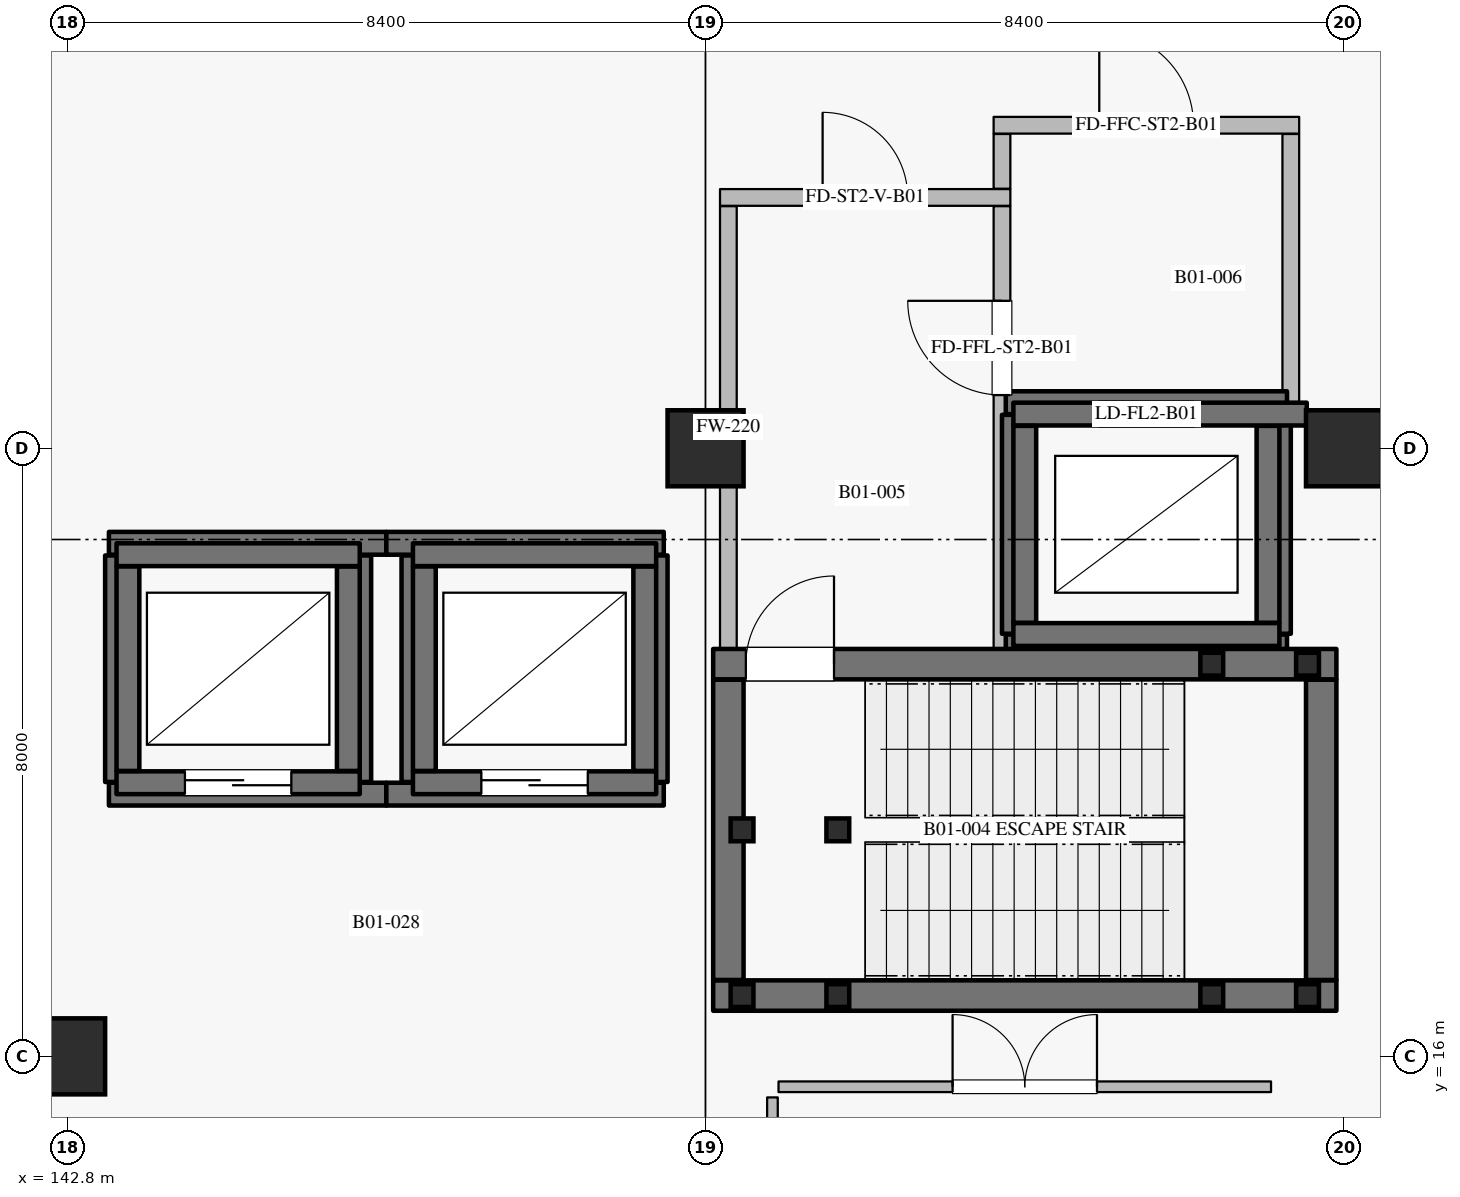
"""IFC4 building model, lengths in metres.
Left out: names, types, materials, properties, quantities, classifications, styles, units other than length and angle.
Written with IfcOpenShell. Run it as: python <this file> out.ifc"""

import sys

from ifc_helpers import new_model, si_unit, direction, frame, frame_2d, origin, origin_2d, place, context, subcontext, project, spatial, rectangle, hollow_rectangle, extrude, element, fill, save


model = new_model("IFC4")
c1 = context("Model", 3, precision=1e-05, world=origin(), true_north=direction((0.0, 1.0)))
c2 = subcontext(c1, "Body", "Model", "MODEL_VIEW")
j1 = project(units=[si_unit("LENGTHUNIT", "METRE"), si_unit("PLANEANGLEUNIT", "RADIAN")], contexts=[c1])
p1 = place(None, origin())
s1 = spatial("IfcSite", under=j1, at=p1, CompositionType="ELEMENT")
p2 = place(p1, origin())
s2 = spatial("IfcBuilding", under=s1, at=p2, CompositionType="ELEMENT")
p3 = place(p2, frame((0.0, 0.0, -5.4)))
s3 = spatial("IfcBuildingStorey", under=s2, at=p3, CompositionType="ELEMENT", Elevation=-5.4)
for number, where, z_axis, x_axis in (
    (1, (142.8, 16.0, 0.0), (0.0, 0.0, 1.0), (1.0, 0.0, 0.0)),
    (2, (151.2, 24.0, 0.0), (0.0, 0.0, 1.0), (1.0, 0.0, 0.0)),
    (3, (159.6, 24.0, 0.0), (0.0, 0.0, 1.0), (1.0, 0.0, 0.0)),
):
    element("IfcColumn", number, at=place(p3, frame(where, z_axis=z_axis, x_axis=x_axis)), inside=s3, PredefinedType="COLUMN", context=c2, shape_type="SweptSolid", body=[
        extrude(rectangle(XDim=1.0, YDim=1.0, at=origin_2d()), origin(), (0.0, 0.0, 1.0), 5.4),
    ])
p4 = place(p3, frame((155.15, 21.4, -1.4), z_axis=(0.0, 0.0, 1.0), x_axis=(1.0, 0.0, 0.0)))
e4 = element("IfcWall", 4, at=p4, inside=s3, PredefinedType="USERDEFINED", context=c2, shape_type="SweptSolid", body=[
    extrude(rectangle(XDim=3.7, YDim=0.3, at=frame_2d((1.85, 0.0))), origin(), (0.0, 0.0, 1.0), 1.4),
])
p5 = place(p3, frame((158.75, 21.56, -1.4), z_axis=(0.0, 0.0, 1.0), x_axis=(0.0, 1.0, 0.0)))
e5 = element("IfcWall", 5, at=p5, inside=s3, PredefinedType="USERDEFINED", context=c2, shape_type="SweptSolid", body=[
    extrude(rectangle(XDim=2.88, YDim=0.3, at=frame_2d((1.44, 0.0))), origin(), (0.0, 0.0, 1.0), 1.4),
])
p6 = place(p3, frame((158.85, 24.6, -1.4), z_axis=(0.0, 0.0, 1.0), x_axis=(-1.0, 0.0, 0.0)))
e6 = element("IfcWall", 6, at=p6, inside=s3, PredefinedType="USERDEFINED", context=c2, shape_type="SweptSolid", body=[
    extrude(rectangle(XDim=3.7, YDim=0.3, at=frame_2d((1.85, 0.0))), origin(), (0.0, 0.0, 1.0), 1.4),
])
p7 = place(p3, frame((155.25, 24.44, -1.4), z_axis=(0.0, 0.0, 1.0), x_axis=(0.0, -1.0, 0.0)))
e7 = element("IfcWall", 7, at=p7, inside=s3, PredefinedType="USERDEFINED", context=c2, shape_type="SweptSolid", body=[
    extrude(rectangle(XDim=2.88, YDim=0.3, at=frame_2d((1.44, 0.0))), origin(), (0.0, 0.0, 1.0), 1.4),
])
p8 = place(p3, frame((143.35, 19.45, -1.4), z_axis=(0.0, 0.0, 1.0), x_axis=(1.0, 0.0, 0.0)))
e8 = element("IfcWall", 8, at=p8, inside=s3, PredefinedType="USERDEFINED", context=c2, shape_type="SweptSolid", body=[
    extrude(rectangle(XDim=3.65, YDim=0.3, at=frame_2d((1.825, 0.0))), origin(), (0.0, 0.0, 1.0), 1.4),
])
p9 = place(p3, frame((146.65, 19.61, -1.4), z_axis=(0.0, 0.0, 1.0), x_axis=(0.0, 1.0, 0.0)))
e9 = element("IfcWall", 9, at=p9, inside=s3, PredefinedType="USERDEFINED", context=c2, shape_type="SweptSolid", body=[
    extrude(rectangle(XDim=2.98, YDim=0.3, at=frame_2d((1.49, 0.0))), origin(), (0.0, 0.0, 1.0), 1.4),
])
p10 = place(p3, frame((147.0, 22.75, -1.4), z_axis=(0.0, 0.0, 1.0), x_axis=(-1.0, 0.0, 0.0)))
e10 = element("IfcWall", 10, at=p10, inside=s3, PredefinedType="USERDEFINED", context=c2, shape_type="SweptSolid", body=[
    extrude(rectangle(XDim=3.65, YDim=0.3, at=frame_2d((1.825, 0.0))), origin(), (0.0, 0.0, 1.0), 1.4),
])
p11 = place(p3, frame((143.45, 22.59, -1.4), z_axis=(0.0, 0.0, 1.0), x_axis=(0.0, -1.0, 0.0)))
e11 = element("IfcWall", 11, at=p11, inside=s3, PredefinedType="USERDEFINED", context=c2, shape_type="SweptSolid", body=[
    extrude(rectangle(XDim=2.98, YDim=0.3, at=frame_2d((1.49, 0.0))), origin(), (0.0, 0.0, 1.0), 1.4),
])
p12 = place(p3, frame((147.0, 19.45, -1.4), z_axis=(0.0, 0.0, 1.0), x_axis=(1.0, 0.0, 0.0)))
e12 = element("IfcWall", 12, at=p12, inside=s3, PredefinedType="USERDEFINED", context=c2, shape_type="SweptSolid", body=[
    extrude(rectangle(XDim=3.65, YDim=0.3, at=frame_2d((1.825, 0.0))), origin(), (0.0, 0.0, 1.0), 1.4),
])
p13 = place(p3, frame((150.55, 19.61, -1.4), z_axis=(0.0, 0.0, 1.0), x_axis=(0.0, 1.0, 0.0)))
e13 = element("IfcWall", 13, at=p13, inside=s3, PredefinedType="USERDEFINED", context=c2, shape_type="SweptSolid", body=[
    extrude(rectangle(XDim=2.98, YDim=0.3, at=frame_2d((1.49, 0.0))), origin(), (0.0, 0.0, 1.0), 1.4),
])
p14 = place(p3, frame((150.65, 22.75, -1.4), z_axis=(0.0, 0.0, 1.0), x_axis=(-1.0, 0.0, 0.0)))
e14 = element("IfcWall", 14, at=p14, inside=s3, PredefinedType="USERDEFINED", context=c2, shape_type="SweptSolid", body=[
    extrude(rectangle(XDim=3.65, YDim=0.3, at=frame_2d((1.825, 0.0))), origin(), (0.0, 0.0, 1.0), 1.4),
])
p15 = place(p3, frame((147.35, 22.59, -1.4), z_axis=(0.0, 0.0, 1.0), x_axis=(0.0, -1.0, 0.0)))
e15 = element("IfcWall", 15, at=p15, inside=s3, PredefinedType="USERDEFINED", context=c2, shape_type="SweptSolid", body=[
    extrude(rectangle(XDim=2.98, YDim=0.3, at=frame_2d((1.49, 0.0))), origin(), (0.0, 0.0, 1.0), 1.4),
])
p16 = place(p3, frame((167.638, 15.655, 0.0), z_axis=(0.0, 0.0, 1.0), x_axis=(-0.72415874468, -0.689633317426, 0.0)))
e16 = element("IfcWall", 16, at=p16, inside=s3, PredefinedType="USERDEFINED", context=c2, shape_type="SweptSolid", body=[
    extrude(rectangle(XDim=10.6, YDim=0.45, at=frame_2d((5.3, 0.0))), origin(), (0.0, 0.0, 1.0), 4.3),
])
p17 = place(p3, frame((155.25, 21.55, 0.0), z_axis=(0.0, 0.0, 1.0), x_axis=(1.0, 0.0, 0.0)))
e17 = element("IfcWall", 17, at=p17, inside=s3, PredefinedType="SHEAR", context=c2, shape_type="SweptSolid", body=[
    extrude(rectangle(XDim=3.5, YDim=0.3, at=frame_2d((1.75, 0.0))), origin(), (0.0, 0.0, 1.0), 4.995),
])
p18 = place(p3, frame((158.6, 21.705, 0.0), z_axis=(0.0, 0.0, 1.0), x_axis=(0.0, 1.0, 0.0)))
e18 = element("IfcWall", 18, at=p18, inside=s3, PredefinedType="SHEAR", context=c2, shape_type="SweptSolid", body=[
    extrude(rectangle(XDim=2.59, YDim=0.3, at=frame_2d((1.295, 0.0))), origin(), (0.0, 0.0, 1.0), 4.995),
])
p19 = place(p3, frame((159.11, 24.45, 0.0), z_axis=(0.0, 0.0, 1.0), x_axis=(-1.0, 0.0, 0.0)))
e19 = element("IfcWall", 19, at=p19, inside=s3, PredefinedType="SHEAR", context=c2, shape_type="SweptSolid", body=[
    extrude(rectangle(XDim=3.86, YDim=0.3, at=frame_2d((1.93, 0.0))), origin(), (0.0, 0.0, 1.0), 4.995),
])
p20 = place(p19, frame((1.485, 0.0, 0.0)))
e20 = element("IfcOpeningElement", 20, at=p20, cuts=e19, PredefinedType="OPENING", context=c2, shape_type="SweptSolid", body=[
    extrude(rectangle(XDim=1.25, YDim=2.25, at=frame_2d((0.625, 1.125))), frame((0.0, 0.16, 0.0), z_axis=(0.0, -1.0, 0.0), x_axis=(1.0, 0.0, 0.0)), (0.0, 0.0, 1.0), 0.32),
])
p21 = place(p3, frame((155.4, 24.295, 0.0), z_axis=(0.0, 0.0, 1.0), x_axis=(0.0, -1.0, 0.0)))
e21 = element("IfcWall", 21, at=p21, inside=s3, PredefinedType="SHEAR", context=c2, shape_type="SweptSolid", body=[
    extrude(rectangle(XDim=2.59, YDim=0.3, at=frame_2d((1.295, 0.0))), origin(), (0.0, 0.0, 1.0), 4.995),
])
p22 = place(p3, frame((143.45, 19.6, 0.0), z_axis=(0.0, 0.0, 1.0), x_axis=(1.0, 0.0, 0.0)))
e22 = element("IfcWall", 22, at=p22, inside=s3, PredefinedType="SHEAR", context=c2, shape_type="SweptSolid", body=[
    extrude(rectangle(XDim=3.2, YDim=0.3, at=frame_2d((1.6, 0.0))), origin(), (0.0, 0.0, 1.0), 4.995),
])
p23 = place(p22, frame((0.9, 0.0, 0.0)))
e23 = element("IfcOpeningElement", 23, at=p23, cuts=e22, PredefinedType="OPENING", context=c2, shape_type="SweptSolid", body=[
    extrude(rectangle(XDim=1.4, YDim=2.35, at=frame_2d((0.7, 1.175))), frame((0.0, 0.16, 0.0), z_axis=(0.0, -1.0, 0.0), x_axis=(1.0, 0.0, 0.0)), (0.0, 0.0, 1.0), 0.32),
])
p24 = place(p3, frame((146.5, 19.755, 0.0), z_axis=(0.0, 0.0, 1.0), x_axis=(0.0, 1.0, 0.0)))
e24 = element("IfcWall", 24, at=p24, inside=s3, PredefinedType="SHEAR", context=c2, shape_type="SweptSolid", body=[
    extrude(rectangle(XDim=2.69, YDim=0.3, at=frame_2d((1.345, 0.0))), origin(), (0.0, 0.0, 1.0), 4.995),
])
p25 = place(p3, frame((146.65, 22.6, 0.0), z_axis=(0.0, 0.0, 1.0), x_axis=(-1.0, 0.0, 0.0)))
e25 = element("IfcWall", 25, at=p25, inside=s3, PredefinedType="SHEAR", context=c2, shape_type="SweptSolid", body=[
    extrude(rectangle(XDim=3.2, YDim=0.3, at=frame_2d((1.6, 0.0))), origin(), (0.0, 0.0, 1.0), 4.995),
])
p26 = place(p3, frame((143.6, 22.445, 0.0), z_axis=(0.0, 0.0, 1.0), x_axis=(0.0, -1.0, 0.0)))
e26 = element("IfcWall", 26, at=p26, inside=s3, PredefinedType="SHEAR", context=c2, shape_type="SweptSolid", body=[
    extrude(rectangle(XDim=2.69, YDim=0.3, at=frame_2d((1.345, 0.0))), origin(), (0.0, 0.0, 1.0), 4.995),
])
p27 = place(p3, frame((147.35, 19.6, 0.0), z_axis=(0.0, 0.0, 1.0), x_axis=(1.0, 0.0, 0.0)))
e27 = element("IfcWall", 27, at=p27, inside=s3, PredefinedType="SHEAR", context=c2, shape_type="SweptSolid", body=[
    extrude(rectangle(XDim=3.2, YDim=0.3, at=frame_2d((1.6, 0.0))), origin(), (0.0, 0.0, 1.0), 4.995),
])
p28 = place(p27, frame((0.9, 0.0, 0.0)))
e28 = element("IfcOpeningElement", 28, at=p28, cuts=e27, PredefinedType="OPENING", context=c2, shape_type="SweptSolid", body=[
    extrude(rectangle(XDim=1.4, YDim=2.35, at=frame_2d((0.7, 1.175))), frame((0.0, 0.16, 0.0), z_axis=(0.0, -1.0, 0.0), x_axis=(1.0, 0.0, 0.0)), (0.0, 0.0, 1.0), 0.32),
])
p29 = place(p3, frame((150.4, 19.755, 0.0), z_axis=(0.0, 0.0, 1.0), x_axis=(0.0, 1.0, 0.0)))
e29 = element("IfcWall", 29, at=p29, inside=s3, PredefinedType="SHEAR", context=c2, shape_type="SweptSolid", body=[
    extrude(rectangle(XDim=2.69, YDim=0.3, at=frame_2d((1.345, 0.0))), origin(), (0.0, 0.0, 1.0), 4.995),
])
p30 = place(p3, frame((150.55, 22.6, 0.0), z_axis=(0.0, 0.0, 1.0), x_axis=(-1.0, 0.0, 0.0)))
e30 = element("IfcWall", 30, at=p30, inside=s3, PredefinedType="SHEAR", context=c2, shape_type="SweptSolid", body=[
    extrude(rectangle(XDim=3.2, YDim=0.3, at=frame_2d((1.6, 0.0))), origin(), (0.0, 0.0, 1.0), 4.995),
])
p31 = place(p3, frame((147.5, 22.445, 0.0), z_axis=(0.0, 0.0, 1.0), x_axis=(0.0, -1.0, 0.0)))
e31 = element("IfcWall", 31, at=p31, inside=s3, PredefinedType="SHEAR", context=c2, shape_type="SweptSolid", body=[
    extrude(rectangle(XDim=2.69, YDim=0.3, at=frame_2d((1.345, 0.0))), origin(), (0.0, 0.0, 1.0), 4.995),
])
p32 = place(p3, frame((151.3, 16.8, 0.0), z_axis=(0.0, 0.0, 1.0), x_axis=(1.0, 0.0, 0.0)))
e32 = element("IfcWall", 32, at=p32, inside=s3, PredefinedType="SHEAR", context=c2, shape_type="SweptSolid", body=[
    extrude(rectangle(XDim=8.2, YDim=0.4, at=frame_2d((4.1, 0.0))), origin(), (0.0, 0.0, 1.0), 4.995),
])
p33 = place(p3, frame((159.3, 17.005, 0.0), z_axis=(0.0, 0.0, 1.0), x_axis=(0.0, 1.0, 0.0)))
e33 = element("IfcWall", 33, at=p33, inside=s3, PredefinedType="SHEAR", context=c2, shape_type="SweptSolid", body=[
    extrude(rectangle(XDim=3.95, YDim=0.4, at=frame_2d((1.975, 0.0))), origin(), (0.0, 0.0, 1.0), 4.995),
])
p34 = place(p3, frame((151.3, 21.16, 0.0), z_axis=(0.0, 0.0, 1.0), x_axis=(1.0, 0.0, 0.0)))
e34 = element("IfcWall", 34, at=p34, inside=s3, PredefinedType="SHEAR", context=c2, shape_type="SweptSolid", body=[
    extrude(rectangle(XDim=8.2, YDim=0.4, at=frame_2d((4.1, 0.0))), origin(), (0.0, 0.0, 1.0), 4.995),
])
p35 = place(p34, frame((0.43, 0.0, 0.0)))
e35 = element("IfcOpeningElement", 35, at=p35, cuts=e34, PredefinedType="OPENING", context=c2, shape_type="SweptSolid", body=[
    extrude(rectangle(XDim=1.16, YDim=2.2, at=frame_2d((0.58, 1.1))), frame((0.0, 0.21, 0.0), z_axis=(0.0, -1.0, 0.0), x_axis=(1.0, 0.0, 0.0)), (0.0, 0.0, 1.0), 0.42),
])
p36 = place(p3, frame((151.5, 17.005, 0.0), z_axis=(0.0, 0.0, 1.0), x_axis=(0.0, 1.0, 0.0)))
e36 = element("IfcWall", 36, at=p36, inside=s3, PredefinedType="SHEAR", context=c2, shape_type="SweptSolid", body=[
    extrude(rectangle(XDim=3.95, YDim=0.4, at=frame_2d((1.975, 0.0))), origin(), (0.0, 0.0, 1.0), 4.995),
])
p37 = place(p3, frame((151.5, 21.365, 0.0), z_axis=(0.0, 0.0, 1.0), x_axis=(0.0, 1.0, 0.0)))
e37 = element("IfcWall", 37, at=p37, inside=s3, PredefinedType="PARTITIONING", context=c2, shape_type="SweptSolid", body=[
    extrude(rectangle(XDim=5.82, YDim=0.22, at=frame_2d((2.91, 0.0))), origin(), (0.0, 0.0, 1.0), 4.05),
])
p38 = place(p3, frame((151.39, 27.3, 0.0), z_axis=(0.0, 0.0, 1.0), x_axis=(1.0, 0.0, 0.0)))
e38 = element("IfcWall", 38, at=p38, inside=s3, PredefinedType="PARTITIONING", context=c2, shape_type="SweptSolid", body=[
    extrude(rectangle(XDim=3.82, YDim=0.22, at=frame_2d((1.91, 0.0))), origin(), (0.0, 0.0, 1.0), 4.995),
])
p39 = place(p38, frame((1.35, 0.0, 0.0)))
e39 = element("IfcOpeningElement", 39, at=p39, cuts=e38, PredefinedType="OPENING", context=c2, shape_type="SweptSolid", body=[
    extrude(rectangle(XDim=1.12, YDim=2.2, at=frame_2d((0.56, 1.1))), frame((0.0, 0.12, 0.0), z_axis=(0.0, -1.0, 0.0), x_axis=(1.0, 0.0, 0.0)), (0.0, 0.0, 1.0), 0.24),
])
p40 = place(p3, frame((155.1, 21.365, 0.0), z_axis=(0.0, 0.0, 1.0), x_axis=(0.0, 1.0, 0.0)))
e40 = element("IfcWall", 40, at=p40, inside=s3, PredefinedType="PARTITIONING", context=c2, shape_type="SweptSolid", body=[
    extrude(rectangle(XDim=5.82, YDim=0.22, at=frame_2d((2.91, 0.0))), origin(), (0.0, 0.0, 1.0), 4.995),
])
p41 = place(p40, frame((3.335, 0.0, 0.0)))
e41 = element("IfcOpeningElement", 41, at=p41, cuts=e40, PredefinedType="OPENING", context=c2, shape_type="SweptSolid", body=[
    extrude(rectangle(XDim=1.24, YDim=2.2, at=frame_2d((0.62, 1.1))), frame((0.0, 0.12, 0.0), z_axis=(0.0, -1.0, 0.0), x_axis=(1.0, 0.0, 0.0)), (0.0, 0.0, 1.0), 0.24),
])
p42 = place(p3, frame((155.1, 27.415, 0.0), z_axis=(0.0, 0.0, 1.0), x_axis=(0.0, 1.0, 0.0)))
e42 = element("IfcWall", 42, at=p42, inside=s3, PredefinedType="PARTITIONING", context=c2, shape_type="SweptSolid", body=[
    extrude(rectangle(XDim=0.72, YDim=0.22, at=frame_2d((0.36, 0.0))), origin(), (0.0, 0.0, 1.0), 4.995),
])
p43 = place(p3, frame((158.9, 24.605, 0.0), z_axis=(0.0, 0.0, 1.0), x_axis=(0.0, 1.0, 0.0)))
e43 = element("IfcWall", 43, at=p43, inside=s3, PredefinedType="PARTITIONING", context=c2, shape_type="SweptSolid", body=[
    extrude(rectangle(XDim=3.53, YDim=0.22, at=frame_2d((1.765, 0.0))), origin(), (0.0, 0.0, 1.0), 4.995),
])
p44 = place(p3, frame((154.99, 28.25, 0.0), z_axis=(0.0, 0.0, 1.0), x_axis=(1.0, 0.0, 0.0)))
e44 = element("IfcWall", 44, at=p44, inside=s3, PredefinedType="PARTITIONING", context=c2, shape_type="SweptSolid", body=[
    extrude(rectangle(XDim=4.02, YDim=0.22, at=frame_2d((2.01, 0.0))), origin(), (0.0, 0.0, 1.0), 4.995),
])
p45 = place(p44, frame((1.39, 0.0, 0.0)))
e45 = element("IfcOpeningElement", 45, at=p45, cuts=e44, PredefinedType="OPENING", context=c2, shape_type="SweptSolid", body=[
    extrude(rectangle(XDim=1.24, YDim=2.2, at=frame_2d((0.62, 1.1))), frame((0.0, 0.12, 0.0), z_axis=(0.0, -1.0, 0.0), x_axis=(1.0, 0.0, 0.0)), (0.0, 0.0, 1.0), 0.24),
])
for number, where, z_axis, x_axis in (
    (46, (151.68, 16.8, 0.0), (0.0, 0.0, 1.0), (1.0, 0.0, 0.0)),
    (47, (151.68, 18.98, 0.0), (0.0, 0.0, 1.0), (1.0, 0.0, 0.0)),
    (48, (152.94, 16.8, 0.0), (0.0, 0.0, 1.0), (1.0, 0.0, 0.0)),
    (49, (152.94, 18.98, 0.0), (0.0, 0.0, 1.0), (1.0, 0.0, 0.0)),
):
    element("IfcColumn", number, at=place(p3, frame(where, z_axis=z_axis, x_axis=x_axis)), inside=s3, PredefinedType="COLUMN", context=c2, shape_type="SweptSolid", body=[
        extrude(hollow_rectangle(XDim=0.3, YDim=0.3, WallThickness=0.012, at=origin_2d()), origin(), (0.0, 0.0, 1.0), 5.22),
    ])
for number, where, z_axis, x_axis in (
    (50, (157.86, 16.8, 0.0), (0.0, 0.0, 1.0), (1.0, 0.0, 0.0)),
    (51, (157.86, 21.16, 0.0), (0.0, 0.0, 1.0), (1.0, 0.0, 0.0)),
    (52, (159.12, 16.8, 0.0), (0.0, 0.0, 1.0), (1.0, 0.0, 0.0)),
    (53, (159.12, 21.16, 0.0), (0.0, 0.0, 1.0), (1.0, 0.0, 0.0)),
):
    element("IfcColumn", number, at=place(p3, frame(where, z_axis=z_axis, x_axis=x_axis)), inside=s3, PredefinedType="COLUMN", context=c2, shape_type="SweptSolid", body=[
        extrude(hollow_rectangle(XDim=0.3, YDim=0.3, WallThickness=0.012, at=origin_2d()), origin(), (0.0, 0.0, 1.0), 2.52),
    ])
p46 = place(p3, frame((152.16, 15.6, 0.0), z_axis=(0.0, 0.0, 1.0), x_axis=(1.0, 0.0, 0.0)))
e54 = element("IfcWall", 54, at=p46, inside=s3, PredefinedType="PARTITIONING", context=c2, shape_type="SweptSolid", body=[
    extrude(rectangle(XDim=6.48, YDim=0.14, at=frame_2d((3.24, 0.0))), origin(), (0.0, 0.0, 1.0), 4.995),
])
p47 = place(p46, frame((2.29, 0.0, 0.0)))
e55 = element("IfcOpeningElement", 55, at=p47, cuts=e54, PredefinedType="OPENING", context=c2, shape_type="SweptSolid", body=[
    extrude(rectangle(XDim=1.9, YDim=2.4, at=frame_2d((0.95, 1.2))), frame((0.0, 0.08, 0.0), z_axis=(0.0, -1.0, 0.0), x_axis=(1.0, 0.0, 0.0)), (0.0, 0.0, 1.0), 0.16),
])
p48 = place(p3, frame((152.08, 9.45, 0.0), z_axis=(0.0, 0.0, 1.0), x_axis=(0.0, 1.0, 0.0)))
e56 = element("IfcWall", 56, at=p48, inside=s3, PredefinedType="PARTITIONING", context=c2, shape_type="SweptSolid", body=[
    extrude(rectangle(XDim=6.01, YDim=0.14, at=frame_2d((3.005, 0.0))), origin(), (0.0, 0.0, 1.0), 4.995),
])
p49 = place(p20, origin())
e57 = element("IfcDoor", 57, at=p49, inside=s3, OperationType="DOUBLE_DOOR_SLIDING", PredefinedType="DOOR", context=c2, shape_type="SweptSolid", body=[
    extrude(rectangle(XDim=1.25, YDim=2.25, at=frame_2d((0.625, 1.125))), frame((0.0, 0.025, 0.0), z_axis=(0.0, -1.0, 0.0), x_axis=(1.0, 0.0, 0.0)), (0.0, 0.0, 1.0), 0.05),
])
fill(e20, e57)
p50 = place(p23, origin())
e58 = element("IfcDoor", 58, at=p50, inside=s3, OperationType="DOUBLE_DOOR_SLIDING", PredefinedType="DOOR", context=c2, shape_type="SweptSolid", body=[
    extrude(rectangle(XDim=1.4, YDim=2.35, at=frame_2d((0.7, 1.175))), frame((0.0, 0.025, 0.0), z_axis=(0.0, -1.0, 0.0), x_axis=(1.0, 0.0, 0.0)), (0.0, 0.0, 1.0), 0.05),
])
fill(e23, e58)
p51 = place(p28, origin())
e59 = element("IfcDoor", 59, at=p51, inside=s3, OperationType="DOUBLE_DOOR_SLIDING", PredefinedType="DOOR", context=c2, shape_type="SweptSolid", body=[
    extrude(rectangle(XDim=1.4, YDim=2.35, at=frame_2d((0.7, 1.175))), frame((0.0, 0.025, 0.0), z_axis=(0.0, -1.0, 0.0), x_axis=(1.0, 0.0, 0.0)), (0.0, 0.0, 1.0), 0.05),
])
fill(e28, e59)
p52 = place(p35, origin())
e60 = element("IfcDoor", 60, at=p52, inside=s3, OperationType="SINGLE_SWING_RIGHT", PredefinedType="DOOR", context=c2, shape_type="SweptSolid", body=[
    extrude(rectangle(XDim=1.16, YDim=2.2, at=frame_2d((0.58, 1.1))), frame((0.0, 0.025, 0.0), z_axis=(0.0, -1.0, 0.0), x_axis=(1.0, 0.0, 0.0)), (0.0, 0.0, 1.0), 0.05),
])
fill(e35, e60)
p53 = place(p39, origin())
e61 = element("IfcDoor", 61, at=p53, inside=s3, OperationType="SINGLE_SWING_LEFT", PredefinedType="DOOR", context=c2, shape_type="SweptSolid", body=[
    extrude(rectangle(XDim=1.12, YDim=2.2, at=frame_2d((0.56, 1.1))), frame((0.0, 0.025, 0.0), z_axis=(0.0, -1.0, 0.0), x_axis=(1.0, 0.0, 0.0)), (0.0, 0.0, 1.0), 0.05),
])
fill(e39, e61)
p54 = place(p41, origin())
e62 = element("IfcDoor", 62, at=p54, inside=s3, OperationType="SINGLE_SWING_RIGHT", PredefinedType="DOOR", context=c2, shape_type="SweptSolid", body=[
    extrude(rectangle(XDim=1.24, YDim=2.2, at=frame_2d((0.62, 1.1))), frame((0.0, 0.025, 0.0), z_axis=(0.0, -1.0, 0.0), x_axis=(1.0, 0.0, 0.0)), (0.0, 0.0, 1.0), 0.05),
])
fill(e41, e62)
p55 = place(p45, origin())
e63 = element("IfcDoor", 63, at=p55, inside=s3, OperationType="SINGLE_SWING_LEFT", PredefinedType="DOOR", context=c2, shape_type="SweptSolid", body=[
    extrude(rectangle(XDim=1.24, YDim=2.2, at=frame_2d((0.62, 1.1))), frame((0.0, 0.025, 0.0), z_axis=(0.0, -1.0, 0.0), x_axis=(1.0, 0.0, 0.0)), (0.0, 0.0, 1.0), 0.05),
])
fill(e45, e63)
p56 = place(p47, origin())
e64 = element("IfcDoor", 64, at=p56, inside=s3, OperationType="DOUBLE_DOOR_SINGLE_SWING", PredefinedType="DOOR", context=c2, shape_type="SweptSolid", body=[
    extrude(rectangle(XDim=1.9, YDim=2.4, at=frame_2d((0.95, 1.2))), frame((0.0, 0.025, 0.0), z_axis=(0.0, -1.0, 0.0), x_axis=(1.0, 0.0, 0.0)), (0.0, 0.0, 1.0), 0.05),
])
fill(e55, e64)
save(model, sys.argv[1])
